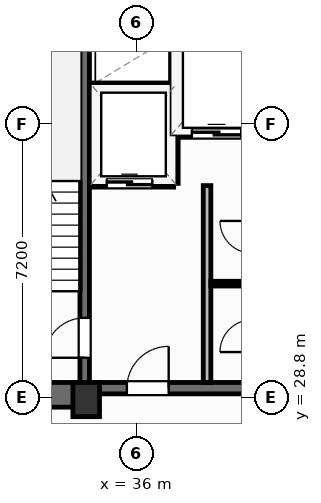
"""IFC4 building model, lengths in metres.
Left out: names, types, materials, properties, quantities, classifications, styles, units other than length and angle.
Written with IfcOpenShell. Run it as: python <this file> out.ifc"""

import sys

from ifc_helpers import new_model, si_unit, direction, frame, frame_2d, origin, origin_2d, place, context, subcontext, project, spatial, rectangle, extrude, element, fill, save


model = new_model("IFC4")
c1 = context("Model", 3, precision=1e-05, world=origin(), true_north=direction((0.0, 1.0)))
c2 = subcontext(c1, "Body", "Model", "MODEL_VIEW")
j1 = project(units=[si_unit("LENGTHUNIT", "METRE"), si_unit("PLANEANGLEUNIT", "RADIAN")], contexts=[c1])
p1 = place(None, origin())
s1 = spatial("IfcSite", under=j1, at=p1, CompositionType="ELEMENT")
p2 = place(p1, origin())
s2 = spatial("IfcBuilding", under=s1, at=p2, CompositionType="ELEMENT")
p3 = place(p2, frame((0.0, 0.0, 223.8)))
s3 = spatial("IfcBuildingStorey", under=s2, at=p3, CompositionType="ELEMENT", Elevation=223.8)
p4 = place(p3, frame((34.68, 28.75, 0.0), z_axis=(0.0, 0.0, 1.0), x_axis=(1.0, 0.0, 0.0)))
e1 = element("IfcColumn", 1, at=p4, inside=s3, PredefinedType="COLUMN", context=c2, shape_type="SweptSolid", body=[
    extrude(rectangle(XDim=0.7, YDim=0.9, at=origin_2d()), origin(), (0.0, 0.0, 1.0), 3.7),
])
p5 = place(p3, frame((30.48, 28.875, 0.0), z_axis=(0.0, 0.0, 1.0), x_axis=(1.0, 0.0, 0.0)))
e2 = element("IfcWall", 2, at=p5, inside=s3, PredefinedType="SHEAR", context=c2, shape_type="SweptSolid", body=[
    extrude(rectangle(XDim=4.32, YDim=0.65, at=frame_2d((2.16, 0.0))), origin(), (0.0, 0.0, 1.0), 3.45),
])
p6 = place(p3, frame((34.8, 29.05, 0.0), z_axis=(0.0, 0.0, 1.0), x_axis=(1.0, 0.0, 0.0)))
e3 = element("IfcWall", 3, at=p6, inside=s3, PredefinedType="SHEAR", context=c2, shape_type="SweptSolid", body=[
    extrude(rectangle(XDim=8.8, YDim=0.3, at=frame_2d((4.4, 0.0))), origin(), (0.0, 0.0, 1.0), 3.45),
])
p7 = place(p6, frame((0.95, 0.0, 0.0)))
e4 = element("IfcOpeningElement", 4, at=p7, cuts=e3, PredefinedType="OPENING", context=c2, shape_type="SweptSolid", body=[
    extrude(rectangle(XDim=1.1, YDim=2.15, at=frame_2d((0.55, 1.075))), frame((0.0, 0.16, 0.0), z_axis=(0.0, -1.0, 0.0), x_axis=(1.0, 0.0, 0.0)), (0.0, 0.0, 1.0), 0.32),
])
p8 = place(p6, frame((6.75, 0.0, 0.0)))
e5 = element("IfcOpeningElement", 5, at=p8, cuts=e3, PredefinedType="OPENING", context=c2, shape_type="SweptSolid", body=[
    extrude(rectangle(XDim=1.1, YDim=2.15, at=frame_2d((0.55, 1.075))), frame((0.0, 0.16, 0.0), z_axis=(0.0, -1.0, 0.0), x_axis=(1.0, 0.0, 0.0)), (0.0, 0.0, 1.0), 0.32),
])
p9 = place(p6, frame((4.45, 0.0, 0.0)))
e6 = element("IfcOpeningElement", 6, at=p9, cuts=e3, PredefinedType="OPENING", context=c2, shape_type="SweptSolid", body=[
    extrude(rectangle(XDim=0.95, YDim=2.15, at=frame_2d((0.475, 1.075))), frame((0.0, 0.16, 0.0), z_axis=(0.0, -1.0, 0.0), x_axis=(1.0, 0.0, 0.0)), (0.0, 0.0, 1.0), 0.32),
])
p10 = place(p3, frame((34.64, 29.2, 0.0), z_axis=(0.0, 0.0, 1.0), x_axis=(0.0, 1.0, 0.0)))
e7 = element("IfcWall", 7, at=p10, inside=s3, PredefinedType="SHEAR", context=c2, shape_type="SweptSolid", body=[
    extrude(rectangle(XDim=9.22, YDim=0.25, at=frame_2d((4.61, 0.0))), origin(), (0.0, 0.0, 1.0), 3.45),
])
p11 = place(p10, frame((0.65, 0.0, 0.0)))
e8 = element("IfcOpeningElement", 8, at=p11, cuts=e7, PredefinedType="OPENING", context=c2, shape_type="SweptSolid", body=[
    extrude(rectangle(XDim=1.05, YDim=2.15, at=frame_2d((0.525, 1.075))), frame((0.0, 0.135, 0.0), z_axis=(0.0, -1.0, 0.0), x_axis=(1.0, 0.0, 0.0)), (0.0, 0.0, 1.0), 0.27),
])
p12 = place(p3, frame((37.86, 29.2, 0.0), z_axis=(0.0, 0.0, 1.0), x_axis=(0.0, 1.0, 0.0)))
e9 = element("IfcWall", 9, at=p12, inside=s3, PredefinedType="PARTITIONING", context=c2, shape_type="SweptSolid", body=[
    extrude(rectangle(XDim=5.18, YDim=0.2, at=frame_2d((2.59, 0.0))), origin(), (0.0, 0.0, 1.0), 3.45),
])
p13 = place(p3, frame((34.8, 34.44, 0.0), z_axis=(0.0, 0.0, 1.0), x_axis=(1.0, 0.0, 0.0)))
e10 = element("IfcWall", 10, at=p13, inside=s3, PredefinedType="PARTITIONING", context=c2, shape_type="SweptSolid", body=[
    extrude(rectangle(XDim=2.18, YDim=0.2, at=frame_2d((1.09, 0.0))), origin(), (0.0, 0.0, 1.0), 3.45),
])
p14 = place(p13, frame((0.42, 0.0, 0.0)))
e11 = element("IfcOpeningElement", 11, at=p14, cuts=e10, PredefinedType="OPENING", context=c2, shape_type="SweptSolid", body=[
    extrude(rectangle(XDim=1.2, YDim=2.2, at=frame_2d((0.6, 1.1))), frame((0.0, 0.11, 0.0), z_axis=(0.0, -1.0, 0.0), x_axis=(1.0, 0.0, 0.0)), (0.0, 0.0, 1.0), 0.22),
])
p15 = place(p3, frame((34.8, 36.98, 0.0), z_axis=(0.0, 0.0, 1.0), x_axis=(1.0, 0.0, 0.0)))
e12 = element("IfcWall", 12, at=p15, inside=s3, PredefinedType="PARTITIONING", context=c2, shape_type="SweptSolid", body=[
    extrude(rectangle(XDim=2.18, YDim=0.2, at=frame_2d((1.09, 0.0))), origin(), (0.0, 0.0, 1.0), 3.45),
])
p16 = place(p3, frame((37.0, 34.44, 0.0), z_axis=(0.0, 0.0, 1.0), x_axis=(0.0, 1.0, 0.0)))
e13 = element("IfcWall", 13, at=p16, inside=s3, PredefinedType="PARTITIONING", context=c2, shape_type="SweptSolid", body=[
    extrude(rectangle(XDim=3.9, YDim=0.2, at=frame_2d((1.95, 0.0))), origin(), (0.0, 0.0, 1.0), 3.45),
])
p17 = place(p3, frame((37.06, 35.75, 0.0), z_axis=(0.0, 0.0, 1.0), x_axis=(1.0, 0.0, 0.0)))
e14 = element("IfcWall", 14, at=p17, inside=s3, PredefinedType="PARTITIONING", context=c2, shape_type="SweptSolid", body=[
    extrude(rectangle(XDim=2.12, YDim=0.2, at=frame_2d((1.06, 0.0))), origin(), (0.0, 0.0, 1.0), 3.45),
])
p18 = place(p17, frame((0.4, 0.0, 0.0)))
e15 = element("IfcOpeningElement", 15, at=p18, cuts=e14, PredefinedType="OPENING", context=c2, shape_type="SweptSolid", body=[
    extrude(rectangle(XDim=1.3, YDim=2.2, at=frame_2d((0.65, 1.1))), frame((0.0, 0.11, 0.0), z_axis=(0.0, -1.0, 0.0), x_axis=(1.0, 0.0, 0.0)), (0.0, 0.0, 1.0), 0.22),
])
p19 = place(p3, frame((37.96, 31.8, 0.0), z_axis=(0.0, 0.0, 1.0), x_axis=(1.0, 0.0, 0.0)))
e16 = element("IfcWall", 16, at=p19, inside=s3, PredefinedType="PARTITIONING", context=c2, shape_type="SweptSolid", body=[
    extrude(rectangle(XDim=1.09, YDim=0.125, at=frame_2d((0.545, 0.0))), origin(), (0.0, 0.0, 1.0), 3.45),
])
p20 = place(p11, origin())
e17 = element("IfcDoor", 17, at=p20, inside=s3, OperationType="SINGLE_SWING_LEFT", PredefinedType="DOOR", context=c2, shape_type="SweptSolid", body=[
    extrude(rectangle(XDim=1.05, YDim=2.15, at=frame_2d((0.525, 1.075))), frame((0.0, 0.025, 0.0), z_axis=(0.0, -1.0, 0.0), x_axis=(1.0, 0.0, 0.0)), (0.0, 0.0, 1.0), 0.05),
])
fill(e8, e17)
p21 = place(p7, origin())
e18 = element("IfcDoor", 18, at=p21, inside=s3, OperationType="SINGLE_SWING_RIGHT", PredefinedType="DOOR", context=c2, shape_type="SweptSolid", body=[
    extrude(rectangle(XDim=1.1, YDim=2.15, at=frame_2d((0.55, 1.075))), frame((0.0, 0.025, 0.0), z_axis=(0.0, -1.0, 0.0), x_axis=(1.0, 0.0, 0.0)), (0.0, 0.0, 1.0), 0.05),
])
fill(e4, e18)
p22 = place(p14, origin())
e19 = element("IfcDoor", 19, at=p22, inside=s3, OperationType="SLIDING_TO_LEFT", PredefinedType="DOOR", context=c2, shape_type="SweptSolid", body=[
    extrude(rectangle(XDim=1.2, YDim=2.2, at=frame_2d((0.6, 1.1))), frame((0.0, 0.025, 0.0), z_axis=(0.0, -1.0, 0.0), x_axis=(1.0, 0.0, 0.0)), (0.0, 0.0, 1.0), 0.05),
])
fill(e11, e19)
p23 = place(p18, origin())
e20 = element("IfcDoor", 20, at=p23, inside=s3, OperationType="SLIDING_TO_LEFT", PredefinedType="DOOR", context=c2, shape_type="SweptSolid", body=[
    extrude(rectangle(XDim=1.3, YDim=2.2, at=frame_2d((0.65, 1.1))), frame((0.0, 0.025, 0.0), z_axis=(0.0, -1.0, 0.0), x_axis=(1.0, 0.0, 0.0)), (0.0, 0.0, 1.0), 0.05),
])
fill(e15, e20)
save(model, sys.argv[1])
